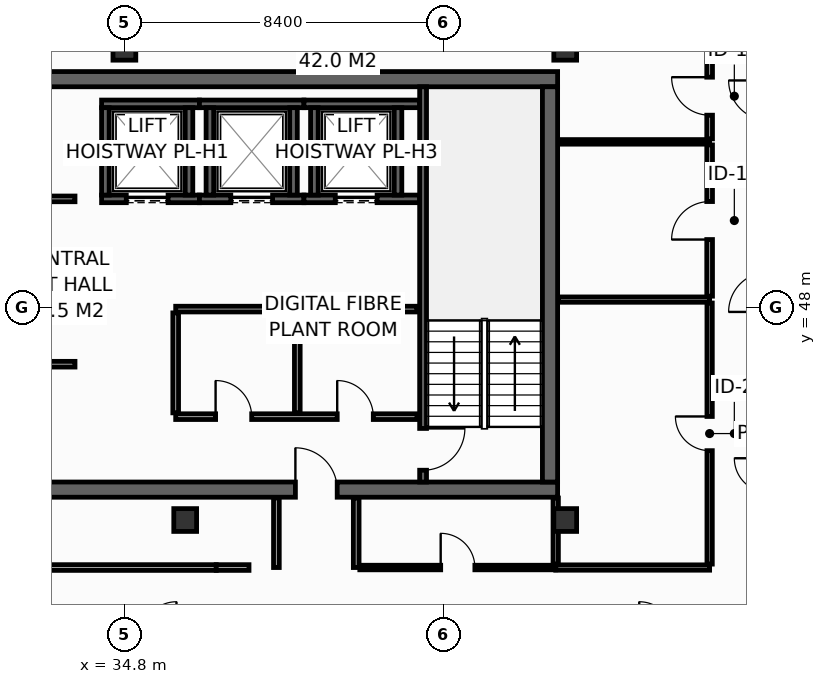
"""IFC4 building model, lengths in metres.
Left out: names, types, materials, properties, quantities, classifications, styles, units other than length and angle.
Written with IfcOpenShell. Run it as: python <this file> out.ifc"""

import sys

from ifc_helpers import new_model, si_unit, direction, frame, frame_2d, origin, origin_2d, place, context, subcontext, project, spatial, rectangle, hollow_rectangle, extrude, element, fill, save


model = new_model("IFC4")
c1 = context("Model", 3, precision=1e-05, world=origin(), true_north=direction((0.0, 1.0)))
c2 = subcontext(c1, "Body", "Model", "MODEL_VIEW")
j1 = project(units=[si_unit("LENGTHUNIT", "METRE"), si_unit("PLANEANGLEUNIT", "RADIAN")], contexts=[c1])
p1 = place(None, origin())
s1 = spatial("IfcSite", under=j1, at=p1, CompositionType="ELEMENT")
p2 = place(p1, origin())
s2 = spatial("IfcBuilding", under=s1, at=p2, CompositionType="ELEMENT")
p3 = place(p2, frame((0.0, 0.0, 291.4)))
s3 = spatial("IfcBuildingStorey", under=s2, at=p3, CompositionType="ELEMENT", Elevation=291.4)
p4 = place(p3, frame((13.7, 43.2, 0.0), z_axis=(0.0, 0.0, 1.0), x_axis=(1.0, 0.0, 0.0)))
e1 = element("IfcWall", 1, at=p4, inside=s3, PredefinedType="SHEAR", context=c2, shape_type="SweptSolid", body=[
    extrude(rectangle(XDim=32.5, YDim=0.4, at=frame_2d((16.25, 0.0))), origin(), (0.0, 0.0, 1.0), 3.55),
])
p5 = place(p4, frame((5.4, 0.0, 0.0)))
e2 = element("IfcOpeningElement", 2, at=p5, cuts=e1, PredefinedType="OPENING", context=c2, shape_type="SweptSolid", body=[
    extrude(rectangle(XDim=1.1, YDim=2.15, at=frame_2d((0.55, 1.075))), frame((0.0, 0.21, 0.0), z_axis=(0.0, -1.0, 0.0), x_axis=(1.0, 0.0, 0.0)), (0.0, 0.0, 1.0), 0.42),
])
p6 = place(p4, frame((25.6, 0.0, 0.0)))
e3 = element("IfcOpeningElement", 3, at=p6, cuts=e1, PredefinedType="OPENING", context=c2, shape_type="SweptSolid", body=[
    extrude(rectangle(XDim=1.1, YDim=2.15, at=frame_2d((0.55, 1.075))), frame((0.0, 0.21, 0.0), z_axis=(0.0, -1.0, 0.0), x_axis=(1.0, 0.0, 0.0)), (0.0, 0.0, 1.0), 0.42),
])
p7 = place(p3, frame((13.7, 54.0, 0.0), z_axis=(0.0, 0.0, 1.0), x_axis=(1.0, 0.0, 0.0)))
e4 = element("IfcWall", 4, at=p7, inside=s3, PredefinedType="SHEAR", context=c2, shape_type="SweptSolid", body=[
    extrude(rectangle(XDim=32.5, YDim=0.4, at=frame_2d((16.25, 0.0))), origin(), (0.0, 0.0, 1.0), 3.55),
])
p8 = place(p3, frame((46.0, 43.4, 0.0), z_axis=(0.0, 0.0, 1.0), x_axis=(0.0, 1.0, 0.0)))
e5 = element("IfcWall", 5, at=p8, inside=s3, PredefinedType="SHEAR", context=c2, shape_type="SweptSolid", body=[
    extrude(rectangle(XDim=10.4, YDim=0.4, at=frame_2d((5.2, 0.0))), origin(), (0.0, 0.0, 1.0), 3.55),
])
for number, where, z_axis, x_axis in (
    (6, (34.8, 54.8, 0.0), (0.0, 0.0, 1.0), (1.0, 0.0, 0.0)),
    (7, (46.4, 54.8, 0.0), (0.0, 0.0, 1.0), (1.0, 0.0, 0.0)),
    (8, (36.4, 42.4, 0.0), (0.0, 0.0, 1.0), (1.0, 0.0, 0.0)),
    (9, (46.4, 42.4, 0.0), (0.0, 0.0, 1.0), (1.0, 0.0, 0.0)),
):
    element("IfcColumn", number, at=place(p3, frame(where, z_axis=z_axis, x_axis=x_axis)), inside=s3, PredefinedType="COLUMN", context=c2, shape_type="SweptSolid", body=[
        extrude(hollow_rectangle(XDim=0.6, YDim=0.6, WallThickness=0.028, at=origin_2d()), origin(), (0.0, 0.0, 1.0), 3.8),
    ])
p9 = place(p3, frame((34.2, 50.85, 0.0), z_axis=(0.0, 0.0, 1.0), x_axis=(1.0, 0.0, 0.0)))
e10 = element("IfcWall", 10, at=p9, inside=s3, PredefinedType="SHEAR", context=c2, shape_type="SweptSolid", body=[
    extrude(rectangle(XDim=2.575, YDim=0.2, at=frame_2d((1.288, 0.0))), origin(), (0.0, 0.0, 1.0), 3.55),
])
p10 = place(p9, frame((0.65, 0.0, 0.0)))
e11 = element("IfcOpeningElement", 11, at=p10, cuts=e10, PredefinedType="OPENING", context=c2, shape_type="SweptSolid", body=[
    extrude(rectangle(XDim=1.1, YDim=2.2, at=frame_2d((0.55, 1.1))), frame((0.0, 0.11, 0.0), z_axis=(0.0, -1.0, 0.0), x_axis=(1.0, 0.0, 0.0)), (0.0, 0.0, 1.0), 0.22),
])
p11 = place(p3, frame((34.2, 53.35, 0.0), z_axis=(0.0, 0.0, 1.0), x_axis=(1.0, 0.0, 0.0)))
e12 = element("IfcWall", 12, at=p11, inside=s3, PredefinedType="SHEAR", context=c2, shape_type="SweptSolid", body=[
    extrude(rectangle(XDim=2.575, YDim=0.2, at=frame_2d((1.288, 0.0))), origin(), (0.0, 0.0, 1.0), 3.55),
])
for number, where, z_axis, x_axis in (
    (13, (34.3, 50.95, 0.0), (0.0, 0.0, 1.0), (0.0, 1.0, 0.0)),
    (14, (36.5, 50.95, 0.0), (0.0, 0.0, 1.0), (0.0, 1.0, 0.0)),
):
    element("IfcWall", number, at=place(p3, frame(where, z_axis=z_axis, x_axis=x_axis)), inside=s3, PredefinedType="SHEAR", context=c2, shape_type="SweptSolid", body=[
        extrude(rectangle(XDim=2.3, YDim=0.2, at=frame_2d((1.15, 0.0))), origin(), (0.0, 0.0, 1.0), 3.55),
    ])
p12 = place(p3, frame((36.775, 50.85, 0.0), z_axis=(0.0, 0.0, 1.0), x_axis=(1.0, 0.0, 0.0)))
e15 = element("IfcWall", 15, at=p12, inside=s3, PredefinedType="SHEAR", context=c2, shape_type="SweptSolid", body=[
    extrude(rectangle(XDim=2.75, YDim=0.2, at=frame_2d((1.375, 0.0))), origin(), (0.0, 0.0, 1.0), 3.55),
])
p13 = place(p12, frame((0.825, 0.0, 0.0)))
e16 = element("IfcOpeningElement", 16, at=p13, cuts=e15, PredefinedType="OPENING", context=c2, shape_type="SweptSolid", body=[
    extrude(rectangle(XDim=1.1, YDim=2.2, at=frame_2d((0.55, 1.1))), frame((0.0, 0.11, 0.0), z_axis=(0.0, -1.0, 0.0), x_axis=(1.0, 0.0, 0.0)), (0.0, 0.0, 1.0), 0.22),
])
p14 = place(p3, frame((36.775, 53.35, 0.0), z_axis=(0.0, 0.0, 1.0), x_axis=(1.0, 0.0, 0.0)))
e17 = element("IfcWall", 17, at=p14, inside=s3, PredefinedType="SHEAR", context=c2, shape_type="SweptSolid", body=[
    extrude(rectangle(XDim=2.75, YDim=0.2, at=frame_2d((1.375, 0.0))), origin(), (0.0, 0.0, 1.0), 3.55),
])
for number, where, z_axis, x_axis in (
    (18, (37.05, 50.95, 0.0), (0.0, 0.0, 1.0), (0.0, 1.0, 0.0)),
    (19, (39.25, 50.95, 0.0), (0.0, 0.0, 1.0), (0.0, 1.0, 0.0)),
):
    element("IfcWall", number, at=place(p3, frame(where, z_axis=z_axis, x_axis=x_axis)), inside=s3, PredefinedType="SHEAR", context=c2, shape_type="SweptSolid", body=[
        extrude(rectangle(XDim=2.3, YDim=0.2, at=frame_2d((1.15, 0.0))), origin(), (0.0, 0.0, 1.0), 3.55),
    ])
p15 = place(p3, frame((39.525, 50.85, 0.0), z_axis=(0.0, 0.0, 1.0), x_axis=(1.0, 0.0, 0.0)))
e20 = element("IfcWall", 20, at=p15, inside=s3, PredefinedType="SHEAR", context=c2, shape_type="SweptSolid", body=[
    extrude(rectangle(XDim=3.045, YDim=0.2, at=frame_2d((1.522, 0.0))), origin(), (0.0, 0.0, 1.0), 3.55),
])
p16 = place(p15, frame((0.825, 0.0, 0.0)))
e21 = element("IfcOpeningElement", 21, at=p16, cuts=e20, PredefinedType="OPENING", context=c2, shape_type="SweptSolid", body=[
    extrude(rectangle(XDim=1.1, YDim=2.2, at=frame_2d((0.55, 1.1))), frame((0.0, 0.11, 0.0), z_axis=(0.0, -1.0, 0.0), x_axis=(1.0, 0.0, 0.0)), (0.0, 0.0, 1.0), 0.22),
])
p17 = place(p3, frame((39.525, 53.35, 0.0), z_axis=(0.0, 0.0, 1.0), x_axis=(1.0, 0.0, 0.0)))
e22 = element("IfcWall", 22, at=p17, inside=s3, PredefinedType="SHEAR", context=c2, shape_type="SweptSolid", body=[
    extrude(rectangle(XDim=3.045, YDim=0.2, at=frame_2d((1.522, 0.0))), origin(), (0.0, 0.0, 1.0), 3.55),
])
for number, where, z_axis, x_axis in (
    (23, (39.8, 50.95, 0.0), (0.0, 0.0, 1.0), (0.0, 1.0, 0.0)),
    (24, (42.0, 50.95, 0.0), (0.0, 0.0, 1.0), (0.0, 1.0, 0.0)),
):
    element("IfcWall", number, at=place(p3, frame(where, z_axis=z_axis, x_axis=x_axis)), inside=s3, PredefinedType="SHEAR", context=c2, shape_type="SweptSolid", body=[
        extrude(rectangle(XDim=2.3, YDim=0.2, at=frame_2d((1.15, 0.0))), origin(), (0.0, 0.0, 1.0), 3.55),
    ])
p18 = place(p3, frame((42.66, 53.8, 0.0), z_axis=(0.0, 0.0, 1.0), x_axis=(0.0, -1.0, 0.0)))
e25 = element("IfcWall", 25, at=p18, inside=s3, PredefinedType="SHEAR", context=c2, shape_type="SweptSolid", body=[
    extrude(rectangle(XDim=10.4, YDim=0.18, at=frame_2d((5.2, 0.0))), origin(), (0.0, 0.0, 1.0), 3.55),
])
p19 = place(p18, frame((8.99, 0.0, 0.0)))
e26 = element("IfcOpeningElement", 26, at=p19, cuts=e25, PredefinedType="OPENING", context=c2, shape_type="SweptSolid", body=[
    extrude(rectangle(XDim=1.1, YDim=2.15, at=frame_2d((0.55, 1.075))), frame((0.0, 0.1, 0.0), z_axis=(0.0, -1.0, 0.0), x_axis=(1.0, 0.0, 0.0)), (0.0, 0.0, 1.0), 0.2),
])
p20 = place(p3, frame((36.15, 45.12, 0.0), z_axis=(0.0, 0.0, 1.0), x_axis=(1.0, 0.0, 0.0)))
e27 = element("IfcWall", 27, at=p20, inside=s3, PredefinedType="PARTITIONING", context=c2, shape_type="SweptSolid", body=[
    extrude(rectangle(XDim=6.35, YDim=0.15, at=frame_2d((3.175, 0.0))), origin(), (0.0, 0.0, 1.0), 3.55),
])
p21 = place(p20, frame((1.05, 0.0, 0.0)))
e28 = element("IfcOpeningElement", 28, at=p21, cuts=e27, PredefinedType="OPENING", context=c2, shape_type="SweptSolid", body=[
    extrude(rectangle(XDim=0.95, YDim=2.15, at=frame_2d((0.475, 1.075))), frame((0.0, 0.085, 0.0), z_axis=(0.0, -1.0, 0.0), x_axis=(1.0, 0.0, 0.0)), (0.0, 0.0, 1.0), 0.17),
])
p22 = place(p20, frame((4.25, 0.0, 0.0)))
e29 = element("IfcOpeningElement", 29, at=p22, cuts=e27, PredefinedType="OPENING", context=c2, shape_type="SweptSolid", body=[
    extrude(rectangle(XDim=0.95, YDim=2.15, at=frame_2d((0.475, 1.075))), frame((0.0, 0.085, 0.0), z_axis=(0.0, -1.0, 0.0), x_axis=(1.0, 0.0, 0.0)), (0.0, 0.0, 1.0), 0.17),
])
p23 = place(p3, frame((36.15, 47.95, 0.0), z_axis=(0.0, 0.0, 1.0), x_axis=(1.0, 0.0, 0.0)))
e30 = element("IfcWall", 30, at=p23, inside=s3, PredefinedType="PARTITIONING", context=c2, shape_type="SweptSolid", body=[
    extrude(rectangle(XDim=6.35, YDim=0.15, at=frame_2d((3.175, 0.0))), origin(), (0.0, 0.0, 1.0), 3.55),
])
for number, where, z_axis, x_axis in (
    (31, (36.15, 45.22, 0.0), (0.0, 0.0, 1.0), (0.0, 1.0, 0.0)),
    (32, (39.35, 45.22, 0.0), (0.0, 0.0, 1.0), (0.0, 1.0, 0.0)),
):
    element("IfcWall", number, at=place(p3, frame(where, z_axis=z_axis, x_axis=x_axis)), inside=s3, PredefinedType="PARTITIONING", context=c2, shape_type="SweptSolid", body=[
        extrude(rectangle(XDim=2.63, YDim=0.15, at=frame_2d((1.315, 0.0))), origin(), (0.0, 0.0, 1.0), 3.55),
    ])
p24 = place(p3, frame((25.85, 50.85, 0.0), z_axis=(0.0, 0.0, 1.0), x_axis=(1.0, 0.0, 0.0)))
e33 = element("IfcWall", 33, at=p24, inside=s3, PredefinedType="PARTITIONING", context=c2, shape_type="SweptSolid", body=[
    extrude(rectangle(XDim=7.65, YDim=0.15, at=frame_2d((3.825, 0.0))), origin(), (0.0, 0.0, 1.0), 3.55),
])
p25 = place(p24, frame((1.25, 0.0, 0.0)))
e34 = element("IfcOpeningElement", 34, at=p25, cuts=e33, PredefinedType="OPENING", context=c2, shape_type="SweptSolid", body=[
    extrude(rectangle(XDim=0.95, YDim=2.15, at=frame_2d((0.475, 1.075))), frame((0.0, 0.085, 0.0), z_axis=(0.0, -1.0, 0.0), x_axis=(1.0, 0.0, 0.0)), (0.0, 0.0, 1.0), 0.17),
])
p26 = place(p24, frame((5.05, 0.0, 0.0)))
e35 = element("IfcOpeningElement", 35, at=p26, cuts=e33, PredefinedType="OPENING", context=c2, shape_type="SweptSolid", body=[
    extrude(rectangle(XDim=0.95, YDim=2.15, at=frame_2d((0.475, 1.075))), frame((0.0, 0.085, 0.0), z_axis=(0.0, -1.0, 0.0), x_axis=(1.0, 0.0, 0.0)), (0.0, 0.0, 1.0), 0.17),
])
p27 = place(p3, frame((25.85, 46.5, 0.0), z_axis=(0.0, 0.0, 1.0), x_axis=(1.0, 0.0, 0.0)))
e36 = element("IfcWall", 36, at=p27, inside=s3, PredefinedType="PARTITIONING", context=c2, shape_type="SweptSolid", body=[
    extrude(rectangle(XDim=7.65, YDim=0.15, at=frame_2d((3.825, 0.0))), origin(), (0.0, 0.0, 1.0), 3.55),
])
p28 = place(p27, frame((2.8, 0.0, 0.0)))
e37 = element("IfcOpeningElement", 37, at=p28, cuts=e36, PredefinedType="OPENING", context=c2, shape_type="SweptSolid", body=[
    extrude(rectangle(XDim=0.95, YDim=2.15, at=frame_2d((0.475, 1.075))), frame((0.0, 0.085, 0.0), z_axis=(0.0, -1.0, 0.0), x_axis=(1.0, 0.0, 0.0)), (0.0, 0.0, 1.0), 0.17),
])
p29 = place(p3, frame((46.15, 41.15, 0.0), z_axis=(0.0, 0.0, 1.0), x_axis=(1.0, 0.0, 0.0)))
e38 = element("IfcWall", 38, at=p29, inside=s3, PredefinedType="PARTITIONING", context=c2, shape_type="SweptSolid", body=[
    extrude(rectangle(XDim=4.05, YDim=0.14, at=frame_2d((2.025, 0.0))), origin(), (0.0, 0.0, 1.0), 3.55),
])
p30 = place(p3, frame((46.15, 41.24, 0.0), z_axis=(0.0, 0.0, 1.0), x_axis=(0.0, 1.0, 0.0)))
e39 = element("IfcWall", 39, at=p30, inside=s3, PredefinedType="PARTITIONING", context=c2, shape_type="SweptSolid", body=[
    extrude(rectangle(XDim=1.74, YDim=0.14, at=frame_2d((0.87, 0.0))), origin(), (0.0, 0.0, 1.0), 3.55),
])
p31 = place(p3, frame((46.22, 48.2, 0.0), z_axis=(0.0, 0.0, 1.0), x_axis=(1.0, 0.0, 0.0)))
e40 = element("IfcWall", 40, at=p31, inside=s3, PredefinedType="PARTITIONING", context=c2, shape_type="SweptSolid", body=[
    extrude(rectangle(XDim=3.98, YDim=0.14, at=frame_2d((1.99, 0.0))), origin(), (0.0, 0.0, 1.0), 3.55),
])
p32 = place(p3, frame((50.2, 41.24, 0.0), z_axis=(0.0, 0.0, 1.0), x_axis=(0.0, 1.0, 0.0)))
e41 = element("IfcWall", 41, at=p32, inside=s3, PredefinedType="PARTITIONING", context=c2, shape_type="SweptSolid", body=[
    extrude(rectangle(XDim=6.87, YDim=0.14, at=frame_2d((3.435, 0.0))), origin(), (0.0, 0.0, 1.0), 2.947),
])
p33 = place(p32, frame((2.985, 0.0, 0.0)))
e42 = element("IfcOpeningElement", 42, at=p33, cuts=e41, PredefinedType="OPENING", context=c2, shape_type="SweptSolid", body=[
    extrude(rectangle(XDim=0.9, YDim=2.1, at=frame_2d((0.45, 1.05))), frame((0.0, 0.08, 0.0), z_axis=(0.0, -1.0, 0.0), x_axis=(1.0, 0.0, 0.0)), (0.0, 0.0, 1.0), 0.16),
])
p34 = place(p3, frame((46.22, 52.35, 0.0), z_axis=(0.0, 0.0, 1.0), x_axis=(1.0, 0.0, 0.0)))
e43 = element("IfcWall", 43, at=p34, inside=s3, PredefinedType="PARTITIONING", context=c2, shape_type="SweptSolid", body=[
    extrude(rectangle(XDim=3.98, YDim=0.12, at=frame_2d((1.99, 0.0))), origin(), (0.0, 0.0, 1.0), 3.55),
])
p35 = place(p3, frame((50.2, 48.29, 0.0), z_axis=(0.0, 0.0, 1.0), x_axis=(0.0, 1.0, 0.0)))
e44 = element("IfcWall", 44, at=p35, inside=s3, PredefinedType="PARTITIONING", context=c2, shape_type="SweptSolid", body=[
    extrude(rectangle(XDim=3.98, YDim=0.15, at=frame_2d((1.99, 0.0))), origin(), (0.0, 0.0, 1.0), 3.55),
])
p36 = place(p35, frame((1.49, 0.0, 0.0)))
e45 = element("IfcOpeningElement", 45, at=p36, cuts=e44, PredefinedType="OPENING", context=c2, shape_type="SweptSolid", body=[
    extrude(rectangle(XDim=1.0, YDim=2.15, at=frame_2d((0.5, 1.075))), frame((0.0, 0.085, 0.0), z_axis=(0.0, -1.0, 0.0), x_axis=(1.0, 0.0, 0.0)), (0.0, 0.0, 1.0), 0.17),
])
p37 = place(p3, frame((50.2, 52.43, 0.0), z_axis=(0.0, 0.0, 1.0), x_axis=(0.0, 1.0, 0.0)))
e46 = element("IfcWall", 46, at=p37, inside=s3, PredefinedType="PARTITIONING", context=c2, shape_type="SweptSolid", body=[
    extrude(rectangle(XDim=3.565, YDim=0.15, at=frame_2d((1.783, 0.0))), origin(), (0.0, 0.0, 1.0), 2.935),
])
p38 = place(p37, frame((0.622, 0.0, 0.0)))
e47 = element("IfcOpeningElement", 47, at=p38, cuts=e46, PredefinedType="OPENING", context=c2, shape_type="SweptSolid", body=[
    extrude(rectangle(XDim=1.0, YDim=2.15, at=frame_2d((0.5, 1.075))), frame((0.0, 0.085, 0.0), z_axis=(0.0, -1.0, 0.0), x_axis=(1.0, 0.0, 0.0)), (0.0, 0.0, 1.0), 0.17),
])
for number, where, z_axis, x_axis in (
    (48, (38.8, 41.15, 0.0), (0.0, 0.0, 1.0), (0.0, 1.0, 0.0)),
    (49, (40.9, 41.15, 0.0), (0.0, 0.0, 1.0), (0.0, 1.0, 0.0)),
):
    element("IfcWall", number, at=place(p3, frame(where, z_axis=z_axis, x_axis=x_axis)), inside=s3, PredefinedType="PARTITIONING", context=c2, shape_type="SweptSolid", body=[
        extrude(rectangle(XDim=1.83, YDim=0.15, at=frame_2d((0.915, 0.0))), origin(), (0.0, 0.0, 1.0), 3.55),
    ])
p39 = place(p3, frame((22.783, 41.15, 0.0), z_axis=(0.0, 0.0, 1.0), x_axis=(1.0, 0.0, 0.0)))
e50 = element("IfcWall", 50, at=p39, inside=s3, PredefinedType="PARTITIONING", context=c2, shape_type="SweptSolid", body=[
    extrude(rectangle(XDim=14.434, YDim=0.15, at=frame_2d((7.217, 0.0))), origin(), (0.0, 0.0, 1.0), 3.55),
])
p40 = place(p39, frame((6.717, 0.0, 0.0)))
e51 = element("IfcOpeningElement", 51, at=p40, cuts=e50, PredefinedType="OPENING", context=c2, shape_type="SweptSolid", body=[
    extrude(rectangle(XDim=1.0, YDim=2.15, at=frame_2d((0.5, 1.075))), frame((0.0, 0.085, 0.0), z_axis=(0.0, -1.0, 0.0), x_axis=(1.0, 0.0, 0.0)), (0.0, 0.0, 1.0), 0.17),
])
p41 = place(p3, frame((37.217, 41.15, 0.0), z_axis=(0.0, 0.0, 1.0), x_axis=(1.0, 0.0, 0.0)))
e52 = element("IfcWall", 52, at=p41, inside=s3, PredefinedType="PARTITIONING", context=c2, shape_type="SweptSolid", body=[
    extrude(rectangle(XDim=0.862, YDim=0.15, at=frame_2d((0.431, 0.0))), origin(), (0.0, 0.0, 1.0), 2.135),
])
p42 = place(p3, frame((40.995, 41.15, 0.0), z_axis=(0.0, 0.0, 1.0), x_axis=(1.0, 0.0, 0.0)))
e53 = element("IfcWall", 53, at=p42, inside=s3, PredefinedType="PARTITIONING", context=c2, shape_type="SweptSolid", body=[
    extrude(rectangle(XDim=5.155, YDim=0.12, at=frame_2d((2.577, 0.0))), origin(), (0.0, 0.0, 1.0), 3.55),
])
p43 = place(p42, frame((2.128, 0.0, 0.0)))
e54 = element("IfcOpeningElement", 54, at=p43, cuts=e53, PredefinedType="OPENING", context=c2, shape_type="SweptSolid", body=[
    extrude(rectangle(XDim=0.9, YDim=2.1, at=frame_2d((0.45, 1.05))), frame((0.0, 0.07, 0.0), z_axis=(0.0, -1.0, 0.0), x_axis=(1.0, 0.0, 0.0)), (0.0, 0.0, 1.0), 0.14),
])
p44 = place(p10, origin())
e55 = element("IfcDoor", 55, at=p44, inside=s3, OperationType="SLIDING_TO_LEFT", PredefinedType="DOOR", context=c2, shape_type="SweptSolid", body=[
    extrude(rectangle(XDim=1.1, YDim=2.2, at=frame_2d((0.55, 1.1))), frame((0.0, 0.025, 0.0), z_axis=(0.0, -1.0, 0.0), x_axis=(1.0, 0.0, 0.0)), (0.0, 0.0, 1.0), 0.05),
])
fill(e11, e55)
p45 = place(p13, origin())
e56 = element("IfcDoor", 56, at=p45, inside=s3, OperationType="SLIDING_TO_LEFT", PredefinedType="DOOR", context=c2, shape_type="SweptSolid", body=[
    extrude(rectangle(XDim=1.1, YDim=2.2, at=frame_2d((0.55, 1.1))), frame((0.0, 0.025, 0.0), z_axis=(0.0, -1.0, 0.0), x_axis=(1.0, 0.0, 0.0)), (0.0, 0.0, 1.0), 0.05),
])
fill(e16, e56)
p46 = place(p16, origin())
e57 = element("IfcDoor", 57, at=p46, inside=s3, OperationType="SLIDING_TO_LEFT", PredefinedType="DOOR", context=c2, shape_type="SweptSolid", body=[
    extrude(rectangle(XDim=1.1, YDim=2.2, at=frame_2d((0.55, 1.1))), frame((0.0, 0.025, 0.0), z_axis=(0.0, -1.0, 0.0), x_axis=(1.0, 0.0, 0.0)), (0.0, 0.0, 1.0), 0.05),
])
fill(e21, e57)
p47 = place(p19, origin())
e58 = element("IfcDoor", 58, at=p47, inside=s3, OperationType="SINGLE_SWING_LEFT", PredefinedType="DOOR", context=c2, shape_type="SweptSolid", body=[
    extrude(rectangle(XDim=1.1, YDim=2.15, at=frame_2d((0.55, 1.075))), frame((0.0, 0.025, 0.0), z_axis=(0.0, -1.0, 0.0), x_axis=(1.0, 0.0, 0.0)), (0.0, 0.0, 1.0), 0.05),
])
fill(e26, e58)
p48 = place(p6, origin())
e59 = element("IfcDoor", 59, at=p48, inside=s3, OperationType="SINGLE_SWING_LEFT", PredefinedType="DOOR", context=c2, shape_type="SweptSolid", body=[
    extrude(rectangle(XDim=1.1, YDim=2.15, at=frame_2d((0.55, 1.075))), frame((0.0, 0.025, 0.0), z_axis=(0.0, -1.0, 0.0), x_axis=(1.0, 0.0, 0.0)), (0.0, 0.0, 1.0), 0.05),
])
fill(e3, e59)
p49 = place(p21, origin())
e60 = element("IfcDoor", 60, at=p49, inside=s3, OperationType="SINGLE_SWING_LEFT", PredefinedType="DOOR", context=c2, shape_type="SweptSolid", body=[
    extrude(rectangle(XDim=0.95, YDim=2.15, at=frame_2d((0.475, 1.075))), frame((0.0, 0.025, 0.0), z_axis=(0.0, -1.0, 0.0), x_axis=(1.0, 0.0, 0.0)), (0.0, 0.0, 1.0), 0.05),
])
fill(e28, e60)
p50 = place(p22, origin())
e61 = element("IfcDoor", 61, at=p50, inside=s3, OperationType="SINGLE_SWING_LEFT", PredefinedType="DOOR", context=c2, shape_type="SweptSolid", body=[
    extrude(rectangle(XDim=0.95, YDim=2.15, at=frame_2d((0.475, 1.075))), frame((0.0, 0.025, 0.0), z_axis=(0.0, -1.0, 0.0), x_axis=(1.0, 0.0, 0.0)), (0.0, 0.0, 1.0), 0.05),
])
fill(e29, e61)
p51 = place(p33, origin())
e62 = element("IfcDoor", 62, at=p51, inside=s3, OperationType="SINGLE_SWING_RIGHT", PredefinedType="DOOR", context=c2, shape_type="SweptSolid", body=[
    extrude(rectangle(XDim=0.9, YDim=2.1, at=frame_2d((0.45, 1.05))), frame((0.0, 0.025, 0.0), z_axis=(0.0, -1.0, 0.0), x_axis=(1.0, 0.0, 0.0)), (0.0, 0.0, 1.0), 0.05),
])
fill(e42, e62)
p52 = place(p36, origin())
e63 = element("IfcDoor", 63, at=p52, inside=s3, OperationType="SINGLE_SWING_LEFT", PredefinedType="DOOR", context=c2, shape_type="SweptSolid", body=[
    extrude(rectangle(XDim=1.0, YDim=2.15, at=frame_2d((0.5, 1.075))), frame((0.0, 0.025, 0.0), z_axis=(0.0, -1.0, 0.0), x_axis=(1.0, 0.0, 0.0)), (0.0, 0.0, 1.0), 0.05),
])
fill(e45, e63)
p53 = place(p38, origin())
e64 = element("IfcDoor", 64, at=p53, inside=s3, OperationType="SINGLE_SWING_RIGHT", PredefinedType="DOOR", context=c2, shape_type="SweptSolid", body=[
    extrude(rectangle(XDim=1.0, YDim=2.15, at=frame_2d((0.5, 1.075))), frame((0.0, 0.025, 0.0), z_axis=(0.0, -1.0, 0.0), x_axis=(1.0, 0.0, 0.0)), (0.0, 0.0, 1.0), 0.05),
])
fill(e47, e64)
p54 = place(p43, origin())
e65 = element("IfcDoor", 65, at=p54, inside=s3, OperationType="SINGLE_SWING_LEFT", PredefinedType="DOOR", context=c2, shape_type="SweptSolid", body=[
    extrude(rectangle(XDim=0.9, YDim=2.1, at=frame_2d((0.45, 1.05))), frame((0.0, 0.025, 0.0), z_axis=(0.0, -1.0, 0.0), x_axis=(1.0, 0.0, 0.0)), (0.0, 0.0, 1.0), 0.05),
])
fill(e54, e65)
save(model, sys.argv[1])
